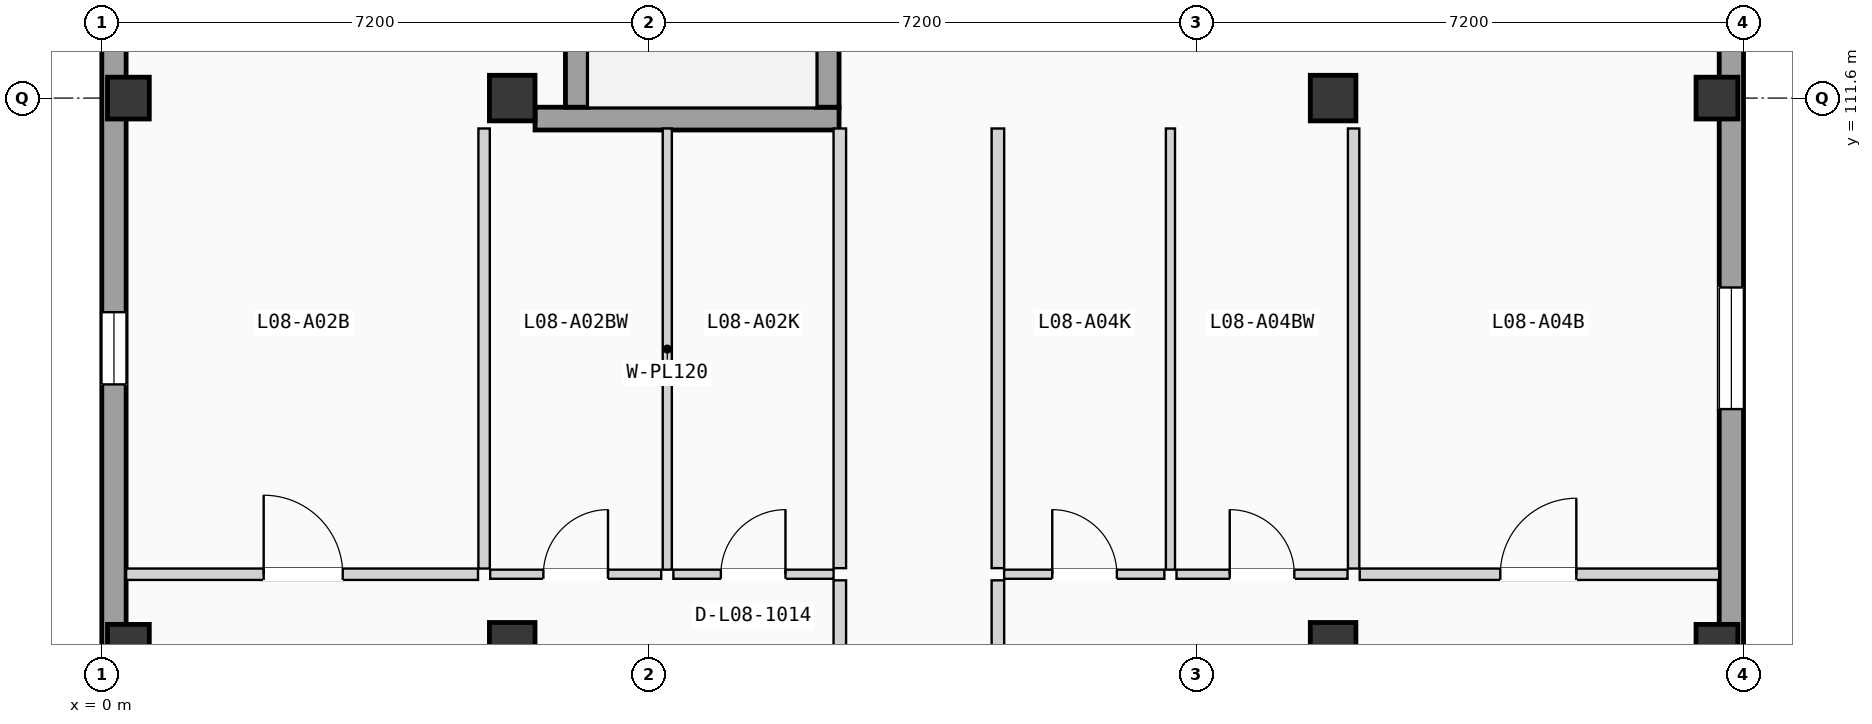
"""IFC4 building model, lengths in metres.
Left out: names, types, materials, properties, quantities, classifications, styles, units other than length and angle.
Written with IfcOpenShell. Run it as: python <this file> out.ifc"""

import sys

from ifc_helpers import new_model, si_unit, direction, frame, frame_2d, origin, origin_2d, place, context, subcontext, project, spatial, rectangle, extrude, element, fill, save


model = new_model("IFC4")
c1 = context("Model", 3, precision=1e-05, world=origin(), true_north=direction((0.0, 1.0)))
c2 = subcontext(c1, "Body", "Model", "MODEL_VIEW")
j1 = project(units=[si_unit("LENGTHUNIT", "METRE"), si_unit("PLANEANGLEUNIT", "RADIAN")], contexts=[c1])
p1 = place(None, origin())
s1 = spatial("IfcSite", under=j1, at=p1, CompositionType="ELEMENT")
p2 = place(p1, origin())
s2 = spatial("IfcBuilding", under=s1, at=p2, CompositionType="ELEMENT")
p3 = place(p2, frame((0.0, 0.0, 27.825)))
s3 = spatial("IfcBuildingStorey", under=s2, at=p3, CompositionType="ELEMENT", Elevation=27.825)
for number, where, z_axis, x_axis in (
    (1, (0.35, 104.4, 0.0), (0.0, 0.0, 1.0), (1.0, 0.0, 0.0)),
    (2, (0.35, 111.6, 0.0), (0.0, 0.0, 1.0), (1.0, 0.0, 0.0)),
):
    element("IfcColumn", number, at=place(p3, frame(where, z_axis=z_axis, x_axis=x_axis)), inside=s3, PredefinedType="COLUMN", context=c2, shape_type="SweptSolid", body=[
        extrude(rectangle(XDim=0.55, YDim=0.55, at=origin_2d()), origin(), (0.0, 0.0, 1.0), 3.15),
    ])
for number, where, z_axis, x_axis in (
    (3, (5.4, 104.4, 0.0), (0.0, 0.0, 1.0), (1.0, 0.0, 0.0)),
    (4, (5.4, 111.6, 0.0), (0.0, 0.0, 1.0), (1.0, 0.0, 0.0)),
    (5, (16.2, 104.4, 0.0), (0.0, 0.0, 1.0), (1.0, 0.0, 0.0)),
    (6, (16.2, 111.6, 0.0), (0.0, 0.0, 1.0), (1.0, 0.0, 0.0)),
):
    element("IfcColumn", number, at=place(p3, frame(where, z_axis=z_axis, x_axis=x_axis)), inside=s3, PredefinedType="COLUMN", context=c2, shape_type="SweptSolid", body=[
        extrude(rectangle(XDim=0.6, YDim=0.6, at=origin_2d()), origin(), (0.0, 0.0, 1.0), 3.15),
    ])
for number, where, z_axis, x_axis in (
    (7, (21.25, 104.4, 0.0), (0.0, 0.0, 1.0), (1.0, 0.0, 0.0)),
    (8, (21.25, 111.6, 0.0), (0.0, 0.0, 1.0), (1.0, 0.0, 0.0)),
):
    element("IfcColumn", number, at=place(p3, frame(where, z_axis=z_axis, x_axis=x_axis)), inside=s3, PredefinedType="COLUMN", context=c2, shape_type="SweptSolid", body=[
        extrude(rectangle(XDim=0.55, YDim=0.55, at=origin_2d()), origin(), (0.0, 0.0, 1.0), 3.15),
    ])
p4 = place(p3, frame((0.16, 68.72, 0.0), z_axis=(0.0, 0.0, 1.0), x_axis=(0.0, 1.0, 0.0)))
e9 = element("IfcWall", 9, at=p4, inside=s3, PredefinedType="SOLIDWALL", context=c2, shape_type="SweptSolid", body=[
    extrude(rectangle(XDim=49.76, YDim=0.32, at=frame_2d((24.88, 0.0))), origin(), (0.0, 0.0, 1.0), 2.89),
])
p5 = place(p4, frame((15.855, 0.0, 0.85)))
e10 = element("IfcOpeningElement", 10, at=p5, cuts=e9, PredefinedType="OPENING", context=c2, shape_type="SweptSolid", body=[
    extrude(rectangle(XDim=0.95, YDim=1.2, at=frame_2d((0.475, 0.6))), frame((0.0, 0.17, 0.0), z_axis=(0.0, -1.0, 0.0), x_axis=(1.0, 0.0, 0.0)), (0.0, 0.0, 1.0), 0.34),
])
p6 = place(p4, frame((9.061, 0.0, 0.9)))
e11 = element("IfcOpeningElement", 11, at=p6, cuts=e9, PredefinedType="OPENING", context=c2, shape_type="SweptSolid", body=[
    extrude(rectangle(XDim=1.35, YDim=1.2, at=frame_2d((0.675, 0.6))), frame((0.0, 0.17, 0.0), z_axis=(0.0, -1.0, 0.0), x_axis=(1.0, 0.0, 0.0)), (0.0, 0.0, 1.0), 0.34),
])
p7 = place(p4, frame((19.065, 0.0, 0.855)))
e12 = element("IfcOpeningElement", 12, at=p7, cuts=e9, PredefinedType="OPENING", context=c2, shape_type="SweptSolid", body=[
    extrude(rectangle(XDim=1.35, YDim=1.35, at=frame_2d((0.675, 0.675))), frame((0.0, 0.17, 0.0), z_axis=(0.0, -1.0, 0.0), x_axis=(1.0, 0.0, 0.0)), (0.0, 0.0, 1.0), 0.34),
])
p8 = place(p4, frame((31.784, 0.0, 0.705)))
e13 = element("IfcOpeningElement", 13, at=p8, cuts=e9, PredefinedType="OPENING", context=c2, shape_type="SweptSolid", body=[
    extrude(rectangle(XDim=1.35, YDim=1.5, at=frame_2d((0.675, 0.75))), frame((0.0, 0.17, 0.0), z_axis=(0.0, -1.0, 0.0), x_axis=(1.0, 0.0, 0.0)), (0.0, 0.0, 1.0), 0.34),
])
p9 = place(p4, frame((25.211, 0.0, 0.555)))
e14 = element("IfcOpeningElement", 14, at=p9, cuts=e9, PredefinedType="OPENING", context=c2, shape_type="SweptSolid", body=[
    extrude(rectangle(XDim=1.35, YDim=1.65, at=frame_2d((0.675, 0.825))), frame((0.0, 0.17, 0.0), z_axis=(0.0, -1.0, 0.0), x_axis=(1.0, 0.0, 0.0)), (0.0, 0.0, 1.0), 0.34),
])
p10 = place(p4, frame((39.113, 0.0, 0.85)))
e15 = element("IfcOpeningElement", 15, at=p10, cuts=e9, PredefinedType="OPENING", context=c2, shape_type="SweptSolid", body=[
    extrude(rectangle(XDim=0.95, YDim=1.2, at=frame_2d((0.475, 0.6))), frame((0.0, 0.17, 0.0), z_axis=(0.0, -1.0, 0.0), x_axis=(1.0, 0.0, 0.0)), (0.0, 0.0, 1.0), 0.34),
])
p11 = place(p3, frame((21.44, 68.72, 0.0), z_axis=(0.0, 0.0, 1.0), x_axis=(0.0, 1.0, 0.0)))
e16 = element("IfcWall", 16, at=p11, inside=s3, PredefinedType="SOLIDWALL", context=c2, shape_type="SweptSolid", body=[
    extrude(rectangle(XDim=49.76, YDim=0.32, at=frame_2d((24.88, 0.0))), origin(), (0.0, 0.0, 1.0), 2.89),
])
p12 = place(p11, frame((15.59, 0.0, 0.9)))
e17 = element("IfcOpeningElement", 17, at=p12, cuts=e16, PredefinedType="OPENING", context=c2, shape_type="SweptSolid", body=[
    extrude(rectangle(XDim=1.48, YDim=1.2, at=frame_2d((0.74, 0.6))), frame((0.0, 0.17, 0.0), z_axis=(0.0, -1.0, 0.0), x_axis=(1.0, 0.0, 0.0)), (0.0, 0.0, 1.0), 0.34),
])
p13 = place(p11, frame((8.996, 0.0, 0.855)))
e18 = element("IfcOpeningElement", 18, at=p13, cuts=e16, PredefinedType="OPENING", context=c2, shape_type="SweptSolid", body=[
    extrude(rectangle(XDim=1.48, YDim=1.35, at=frame_2d((0.74, 0.675))), frame((0.0, 0.17, 0.0), z_axis=(0.0, -1.0, 0.0), x_axis=(1.0, 0.0, 0.0)), (0.0, 0.0, 1.0), 0.34),
])
p14 = place(p11, frame((19.0, 0.0, 0.705)))
e19 = element("IfcOpeningElement", 19, at=p14, cuts=e16, PredefinedType="OPENING", context=c2, shape_type="SweptSolid", body=[
    extrude(rectangle(XDim=1.48, YDim=1.5, at=frame_2d((0.74, 0.75))), frame((0.0, 0.17, 0.0), z_axis=(0.0, -1.0, 0.0), x_axis=(1.0, 0.0, 0.0)), (0.0, 0.0, 1.0), 0.34),
])
p15 = place(p11, frame((31.719, 0.0, 0.555)))
e20 = element("IfcOpeningElement", 20, at=p15, cuts=e16, PredefinedType="OPENING", context=c2, shape_type="SweptSolid", body=[
    extrude(rectangle(XDim=1.48, YDim=1.65, at=frame_2d((0.74, 0.825))), frame((0.0, 0.17, 0.0), z_axis=(0.0, -1.0, 0.0), x_axis=(1.0, 0.0, 0.0)), (0.0, 0.0, 1.0), 0.34),
])
p16 = place(p11, frame((25.411, 0.0, 0.85)))
e21 = element("IfcOpeningElement", 21, at=p16, cuts=e16, PredefinedType="OPENING", context=c2, shape_type="SweptSolid", body=[
    extrude(rectangle(XDim=0.95, YDim=1.2, at=frame_2d((0.475, 0.6))), frame((0.0, 0.17, 0.0), z_axis=(0.0, -1.0, 0.0), x_axis=(1.0, 0.0, 0.0)), (0.0, 0.0, 1.0), 0.34),
])
p17 = place(p11, frame((38.788, 0.0, 0.9)))
e22 = element("IfcOpeningElement", 22, at=p17, cuts=e16, PredefinedType="OPENING", context=c2, shape_type="SweptSolid", body=[
    extrude(rectangle(XDim=1.6, YDim=1.2, at=frame_2d((0.8, 0.6))), frame((0.0, 0.17, 0.0), z_axis=(0.0, -1.0, 0.0), x_axis=(1.0, 0.0, 0.0)), (0.0, 0.0, 1.0), 0.34),
])
p18 = place(p3, frame((5.7, 111.33, 0.0), z_axis=(0.0, 0.0, 1.0), x_axis=(1.0, 0.0, 0.0)))
e23 = element("IfcWall", 23, at=p18, inside=s3, PredefinedType="SHEAR", context=c2, shape_type="SweptSolid", body=[
    extrude(rectangle(XDim=4.0, YDim=0.3, at=frame_2d((2.0, 0.0))), origin(), (0.0, 0.0, 1.0), 2.89),
])
p19 = place(p3, frame((6.25, 111.48, 0.0), z_axis=(0.0, 0.0, 1.0), x_axis=(0.0, 1.0, 0.0)))
e24 = element("IfcWall", 24, at=p19, inside=s3, PredefinedType="SHEAR", context=c2, shape_type="SweptSolid", body=[
    extrude(rectangle(XDim=7.0, YDim=0.3, at=frame_2d((3.5, 0.0))), origin(), (0.0, 0.0, 1.0), 2.89),
])
p20 = place(p3, frame((9.55, 111.48, 0.0), z_axis=(0.0, 0.0, 1.0), x_axis=(0.0, 1.0, 0.0)))
e25 = element("IfcWall", 25, at=p20, inside=s3, PredefinedType="SHEAR", context=c2, shape_type="SweptSolid", body=[
    extrude(rectangle(XDim=7.0, YDim=0.3, at=frame_2d((3.5, 0.0))), origin(), (0.0, 0.0, 1.0), 2.89),
])
p21 = place(p20, frame((5.625, 0.0, 0.0)))
e26 = element("IfcOpeningElement", 26, at=p21, cuts=e25, PredefinedType="OPENING", context=c2, shape_type="SweptSolid", body=[
    extrude(rectangle(XDim=1.15, YDim=2.12, at=frame_2d((0.575, 1.06))), frame((0.0, 0.16, 0.0), z_axis=(0.0, -1.0, 0.0), x_axis=(1.0, 0.0, 0.0)), (0.0, 0.0, 1.0), 0.32),
])
p22 = place(p3, frame((9.71, 98.227, 0.0), z_axis=(0.0, 0.0, 1.0), x_axis=(0.0, 1.0, 0.0)))
e27 = element("IfcWall", 27, at=p22, inside=s3, PredefinedType="PARTITIONING", context=c2, shape_type="SweptSolid", body=[
    extrude(rectangle(XDim=7.028, YDim=0.165, at=frame_2d((3.514, 0.0))), origin(), (0.0, 0.0, 1.0), 2.87),
])
p23 = place(p22, frame((3.024, 0.0, 0.0)))
e28 = element("IfcOpeningElement", 28, at=p23, cuts=e27, PredefinedType="OPENING", context=c2, shape_type="SweptSolid", body=[
    extrude(rectangle(XDim=0.98, YDim=2.08, at=frame_2d((0.49, 1.04))), frame((0.0, 0.093, 0.0), z_axis=(0.0, -1.0, 0.0), x_axis=(1.0, 0.0, 0.0)), (0.0, 0.0, 1.0), 0.185),
])
p24 = place(p3, frame((9.71, 105.415, 0.0), z_axis=(0.0, 0.0, 1.0), x_axis=(0.0, 1.0, 0.0)))
e29 = element("IfcWall", 29, at=p24, inside=s3, PredefinedType="PARTITIONING", context=c2, shape_type="SweptSolid", body=[
    extrude(rectangle(XDim=5.785, YDim=0.165, at=frame_2d((2.893, 0.0))), origin(), (0.0, 0.0, 1.0), 2.87),
])
p25 = place(p3, frame((11.79, 98.227, 0.0), z_axis=(0.0, 0.0, 1.0), x_axis=(0.0, 1.0, 0.0)))
e30 = element("IfcWall", 30, at=p25, inside=s3, PredefinedType="PARTITIONING", context=c2, shape_type="SweptSolid", body=[
    extrude(rectangle(XDim=7.028, YDim=0.165, at=frame_2d((3.514, 0.0))), origin(), (0.0, 0.0, 1.0), 2.87),
])
p26 = place(p25, frame((3.024, 0.0, 0.0)))
e31 = element("IfcOpeningElement", 31, at=p26, cuts=e30, PredefinedType="OPENING", context=c2, shape_type="SweptSolid", body=[
    extrude(rectangle(XDim=0.98, YDim=2.08, at=frame_2d((0.49, 1.04))), frame((0.0, 0.093, 0.0), z_axis=(0.0, -1.0, 0.0), x_axis=(1.0, 0.0, 0.0)), (0.0, 0.0, 1.0), 0.185),
])
p27 = place(p3, frame((11.79, 105.415, 0.0), z_axis=(0.0, 0.0, 1.0), x_axis=(0.0, 1.0, 0.0)))
e32 = element("IfcWall", 32, at=p27, inside=s3, PredefinedType="PARTITIONING", context=c2, shape_type="SweptSolid", body=[
    extrude(rectangle(XDim=5.785, YDim=0.165, at=frame_2d((2.893, 0.0))), origin(), (0.0, 0.0, 1.0), 2.87),
])
p28 = place(p3, frame((7.52, 105.335, 0.0), z_axis=(0.0, 0.0, 1.0), x_axis=(1.0, 0.0, 0.0)))
e33 = element("IfcWall", 33, at=p28, inside=s3, PredefinedType="PARTITIONING", context=c2, shape_type="SweptSolid", body=[
    extrude(rectangle(XDim=2.108, YDim=0.12, at=frame_2d((1.054, 0.0))), origin(), (0.0, 0.0, 1.0), 2.87),
])
p29 = place(p28, frame((0.625, 0.0, 0.0)))
e34 = element("IfcOpeningElement", 34, at=p29, cuts=e33, PredefinedType="OPENING", context=c2, shape_type="SweptSolid", body=[
    extrude(rectangle(XDim=0.85, YDim=2.01, at=frame_2d((0.425, 1.005))), frame((0.0, 0.07, 0.0), z_axis=(0.0, -1.0, 0.0), x_axis=(1.0, 0.0, 0.0)), (0.0, 0.0, 1.0), 0.14),
])
p30 = place(p3, frame((0.32, 105.335, 0.0), z_axis=(0.0, 0.0, 1.0), x_axis=(1.0, 0.0, 0.0)))
e35 = element("IfcWall", 35, at=p30, inside=s3, PredefinedType="PARTITIONING", context=c2, shape_type="SweptSolid", body=[
    extrude(rectangle(XDim=4.63, YDim=0.15, at=frame_2d((2.315, 0.0))), origin(), (0.0, 0.0, 1.0), 2.87),
])
p31 = place(p30, frame((1.81, 0.0, 0.0)))
e36 = element("IfcOpeningElement", 36, at=p31, cuts=e35, PredefinedType="OPENING", context=c2, shape_type="SweptSolid", body=[
    extrude(rectangle(XDim=1.04, YDim=2.08, at=frame_2d((0.52, 1.04))), frame((0.0, 0.085, 0.0), z_axis=(0.0, -1.0, 0.0), x_axis=(1.0, 0.0, 0.0)), (0.0, 0.0, 1.0), 0.17),
])
p32 = place(p3, frame((5.11, 105.335, 0.0), z_axis=(0.0, 0.0, 1.0), x_axis=(1.0, 0.0, 0.0)))
e37 = element("IfcWall", 37, at=p32, inside=s3, PredefinedType="PARTITIONING", context=c2, shape_type="SweptSolid", body=[
    extrude(rectangle(XDim=2.25, YDim=0.12, at=frame_2d((1.125, 0.0))), origin(), (0.0, 0.0, 1.0), 2.87),
])
p33 = place(p32, frame((0.7, 0.0, 0.0)))
e38 = element("IfcOpeningElement", 38, at=p33, cuts=e37, PredefinedType="OPENING", context=c2, shape_type="SweptSolid", body=[
    extrude(rectangle(XDim=0.85, YDim=2.01, at=frame_2d((0.425, 1.005))), frame((0.0, 0.07, 0.0), z_axis=(0.0, -1.0, 0.0), x_axis=(1.0, 0.0, 0.0)), (0.0, 0.0, 1.0), 0.14),
])
p34 = place(p3, frame((7.44, 105.395, 0.0), z_axis=(0.0, 0.0, 1.0), x_axis=(0.0, 1.0, 0.0)))
e39 = element("IfcWall", 39, at=p34, inside=s3, PredefinedType="PARTITIONING", context=c2, shape_type="SweptSolid", body=[
    extrude(rectangle(XDim=5.805, YDim=0.12, at=frame_2d((2.902, 0.0))), origin(), (0.0, 0.0, 1.0), 2.87),
])
p35 = place(p3, frame((5.03, 105.41, 0.0), z_axis=(0.0, 0.0, 1.0), x_axis=(0.0, 1.0, 0.0)))
e40 = element("IfcWall", 40, at=p35, inside=s3, PredefinedType="PARTITIONING", context=c2, shape_type="SweptSolid", body=[
    extrude(rectangle(XDim=5.79, YDim=0.15, at=frame_2d((2.895, 0.0))), origin(), (0.0, 0.0, 1.0), 2.87),
])
p36 = place(p3, frame((11.872, 105.335, 0.0), z_axis=(0.0, 0.0, 1.0), x_axis=(1.0, 0.0, 0.0)))
e41 = element("IfcWall", 41, at=p36, inside=s3, PredefinedType="PARTITIONING", context=c2, shape_type="SweptSolid", body=[
    extrude(rectangle(XDim=2.108, YDim=0.12, at=frame_2d((1.054, 0.0))), origin(), (0.0, 0.0, 1.0), 2.87),
])
p37 = place(p36, frame((0.633, 0.0, 0.0)))
e42 = element("IfcOpeningElement", 42, at=p37, cuts=e41, PredefinedType="OPENING", context=c2, shape_type="SweptSolid", body=[
    extrude(rectangle(XDim=0.85, YDim=2.01, at=frame_2d((0.425, 1.005))), frame((0.0, 0.07, 0.0), z_axis=(0.0, -1.0, 0.0), x_axis=(1.0, 0.0, 0.0)), (0.0, 0.0, 1.0), 0.14),
])
p38 = place(p3, frame((16.55, 105.335, 0.0), z_axis=(0.0, 0.0, 1.0), x_axis=(1.0, 0.0, 0.0)))
e43 = element("IfcWall", 43, at=p38, inside=s3, PredefinedType="PARTITIONING", context=c2, shape_type="SweptSolid", body=[
    extrude(rectangle(XDim=4.73, YDim=0.15, at=frame_2d((2.365, 0.0))), origin(), (0.0, 0.0, 1.0), 2.87),
])
p39 = place(p38, frame((1.85, 0.0, 0.0)))
e44 = element("IfcOpeningElement", 44, at=p39, cuts=e43, PredefinedType="OPENING", context=c2, shape_type="SweptSolid", body=[
    extrude(rectangle(XDim=1.0, YDim=2.06, at=frame_2d((0.5, 1.03))), frame((0.0, 0.085, 0.0), z_axis=(0.0, -1.0, 0.0), x_axis=(1.0, 0.0, 0.0)), (0.0, 0.0, 1.0), 0.17),
])
p40 = place(p3, frame((14.14, 105.335, 0.0), z_axis=(0.0, 0.0, 1.0), x_axis=(1.0, 0.0, 0.0)))
e45 = element("IfcWall", 45, at=p40, inside=s3, PredefinedType="PARTITIONING", context=c2, shape_type="SweptSolid", body=[
    extrude(rectangle(XDim=2.25, YDim=0.12, at=frame_2d((1.125, 0.0))), origin(), (0.0, 0.0, 1.0), 2.87),
])
p41 = place(p40, frame((0.7, 0.0, 0.0)))
e46 = element("IfcOpeningElement", 46, at=p41, cuts=e45, PredefinedType="OPENING", context=c2, shape_type="SweptSolid", body=[
    extrude(rectangle(XDim=0.85, YDim=2.01, at=frame_2d((0.425, 1.005))), frame((0.0, 0.07, 0.0), z_axis=(0.0, -1.0, 0.0), x_axis=(1.0, 0.0, 0.0)), (0.0, 0.0, 1.0), 0.14),
])
p42 = place(p3, frame((14.06, 105.395, 0.0), z_axis=(0.0, 0.0, 1.0), x_axis=(0.0, 1.0, 0.0)))
e47 = element("IfcWall", 47, at=p42, inside=s3, PredefinedType="PARTITIONING", context=c2, shape_type="SweptSolid", body=[
    extrude(rectangle(XDim=5.805, YDim=0.12, at=frame_2d((2.902, 0.0))), origin(), (0.0, 0.0, 1.0), 2.87),
])
p43 = place(p3, frame((16.47, 105.41, 0.0), z_axis=(0.0, 0.0, 1.0), x_axis=(0.0, 1.0, 0.0)))
e48 = element("IfcWall", 48, at=p43, inside=s3, PredefinedType="PARTITIONING", context=c2, shape_type="SweptSolid", body=[
    extrude(rectangle(XDim=5.79, YDim=0.15, at=frame_2d((2.895, 0.0))), origin(), (0.0, 0.0, 1.0), 2.87),
])
p44 = place(p10, origin())
e49 = element("IfcWindow", 49, at=p44, inside=s3, PartitioningType="SINGLE_PANEL", PredefinedType="WINDOW", context=c2, shape_type="SweptSolid", body=[
    extrude(rectangle(XDim=0.95, YDim=1.2, at=frame_2d((0.475, 0.6))), frame((0.0, 0.03, 0.0), z_axis=(0.0, -1.0, 0.0), x_axis=(1.0, 0.0, 0.0)), (0.0, 0.0, 1.0), 0.06),
])
fill(e15, e49)
p45 = place(p17, origin())
e50 = element("IfcWindow", 50, at=p45, inside=s3, PartitioningType="DOUBLE_PANEL_VERTICAL", PredefinedType="WINDOW", context=c2, shape_type="SweptSolid", body=[
    extrude(rectangle(XDim=1.6, YDim=1.2, at=frame_2d((0.8, 0.6))), frame((0.0, 0.03, 0.0), z_axis=(0.0, -1.0, 0.0), x_axis=(1.0, 0.0, 0.0)), (0.0, 0.0, 1.0), 0.06),
])
fill(e22, e50)
p46 = place(p29, origin())
e51 = element("IfcDoor", 51, at=p46, inside=s3, OperationType="SINGLE_SWING_RIGHT", PredefinedType="DOOR", context=c2, shape_type="SweptSolid", body=[
    extrude(rectangle(XDim=0.85, YDim=2.01, at=frame_2d((0.425, 1.005))), frame((0.0, 0.025, 0.0), z_axis=(0.0, -1.0, 0.0), x_axis=(1.0, 0.0, 0.0)), (0.0, 0.0, 1.0), 0.05),
])
fill(e34, e51)
p47 = place(p31, origin())
e52 = element("IfcDoor", 52, at=p47, inside=s3, OperationType="SINGLE_SWING_LEFT", PredefinedType="DOOR", context=c2, shape_type="SweptSolid", body=[
    extrude(rectangle(XDim=1.04, YDim=2.08, at=frame_2d((0.52, 1.04))), frame((0.0, 0.025, 0.0), z_axis=(0.0, -1.0, 0.0), x_axis=(1.0, 0.0, 0.0)), (0.0, 0.0, 1.0), 0.05),
])
fill(e36, e52)
p48 = place(p33, origin())
e53 = element("IfcDoor", 53, at=p48, inside=s3, OperationType="SINGLE_SWING_RIGHT", PredefinedType="DOOR", context=c2, shape_type="SweptSolid", body=[
    extrude(rectangle(XDim=0.85, YDim=2.01, at=frame_2d((0.425, 1.005))), frame((0.0, 0.025, 0.0), z_axis=(0.0, -1.0, 0.0), x_axis=(1.0, 0.0, 0.0)), (0.0, 0.0, 1.0), 0.05),
])
fill(e38, e53)
p49 = place(p37, origin())
e54 = element("IfcDoor", 54, at=p49, inside=s3, OperationType="SINGLE_SWING_LEFT", PredefinedType="DOOR", context=c2, shape_type="SweptSolid", body=[
    extrude(rectangle(XDim=0.85, YDim=2.01, at=frame_2d((0.425, 1.005))), frame((0.0, 0.025, 0.0), z_axis=(0.0, -1.0, 0.0), x_axis=(1.0, 0.0, 0.0)), (0.0, 0.0, 1.0), 0.05),
])
fill(e42, e54)
p50 = place(p39, origin())
e55 = element("IfcDoor", 55, at=p50, inside=s3, OperationType="SINGLE_SWING_RIGHT", PredefinedType="DOOR", context=c2, shape_type="SweptSolid", body=[
    extrude(rectangle(XDim=1.0, YDim=2.06, at=frame_2d((0.5, 1.03))), frame((0.0, 0.025, 0.0), z_axis=(0.0, -1.0, 0.0), x_axis=(1.0, 0.0, 0.0)), (0.0, 0.0, 1.0), 0.05),
])
fill(e44, e55)
p51 = place(p41, origin())
e56 = element("IfcDoor", 56, at=p51, inside=s3, OperationType="SINGLE_SWING_LEFT", PredefinedType="DOOR", context=c2, shape_type="SweptSolid", body=[
    extrude(rectangle(XDim=0.85, YDim=2.01, at=frame_2d((0.425, 1.005))), frame((0.0, 0.025, 0.0), z_axis=(0.0, -1.0, 0.0), x_axis=(1.0, 0.0, 0.0)), (0.0, 0.0, 1.0), 0.05),
])
fill(e46, e56)
save(model, sys.argv[1])
